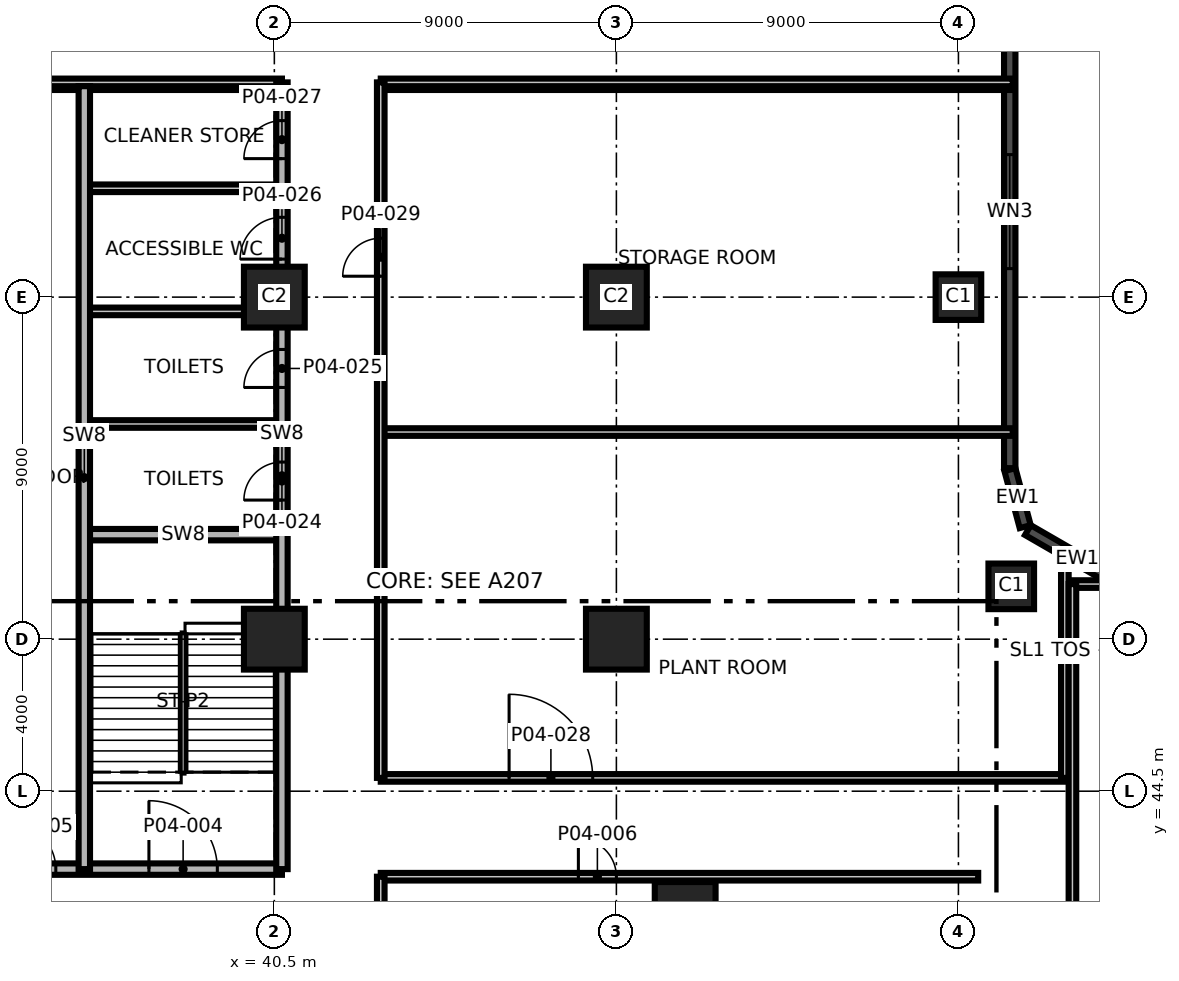
"""IFC4 building model, lengths in metres.
Left out: names, types, materials, properties, quantities, classifications, styles, units other than length and angle.
Written with IfcOpenShell. Run it as: python <this file> out.ifc"""

import sys

from ifc_helpers import new_model, si_unit, direction, frame, frame_2d, origin, origin_2d, place, context, subcontext, project, spatial, rectangle, extrude, element, fill, save


model = new_model("IFC4")
c1 = context("Model", 3, precision=1e-05, world=origin(), true_north=direction((0.0, 1.0)))
c2 = subcontext(c1, "Body", "Model", "MODEL_VIEW")
j1 = project(units=[si_unit("LENGTHUNIT", "METRE"), si_unit("PLANEANGLEUNIT", "RADIAN")], contexts=[c1])
p1 = place(None, origin())
s1 = spatial("IfcSite", under=j1, at=p1, CompositionType="ELEMENT")
p2 = place(p1, origin())
s2 = spatial("IfcBuilding", under=s1, at=p2, CompositionType="ELEMENT")
p3 = place(p2, frame((0.0, 0.0, 23.5)))
s3 = spatial("IfcBuildingStorey", under=s2, at=p3, CompositionType="ELEMENT", Elevation=23.5)
for number, where, z_axis, x_axis in (
    (1, (40.5, 48.5, 0.0), (0.0, 0.0, 1.0), (1.0, 0.0, 0.0)),
    (2, (49.5, 48.5, 0.0), (0.0, 0.0, 1.0), (1.0, 0.0, 0.0)),
):
    element("IfcColumn", number, at=place(p3, frame(where, z_axis=z_axis, x_axis=x_axis)), inside=s3, PredefinedType="COLUMN", context=c2, shape_type="SweptSolid", body=[
        extrude(rectangle(XDim=1.6, YDim=1.6, at=origin_2d()), origin(), (0.0, 0.0, 1.0), 5.0),
    ])
p4 = place(p3, frame((59.89, 49.89, 0.0), z_axis=(0.0, 0.0, 1.0), x_axis=(1.0, 0.0, 0.0)))
e3 = element("IfcColumn", 3, at=p4, inside=s3, PredefinedType="COLUMN", context=c2, shape_type="SweptSolid", body=[
    extrude(rectangle(XDim=1.2, YDim=1.2, at=origin_2d()), origin(), (0.0, 0.0, 1.0), 5.0),
])
for number, where, z_axis, x_axis in (
    (4, (40.5, 57.5, 0.0), (0.0, 0.0, 1.0), (1.0, 0.0, 0.0)),
    (5, (49.5, 57.5, 0.0), (0.0, 0.0, 1.0), (1.0, 0.0, 0.0)),
):
    element("IfcColumn", number, at=place(p3, frame(where, z_axis=z_axis, x_axis=x_axis)), inside=s3, PredefinedType="COLUMN", context=c2, shape_type="SweptSolid", body=[
        extrude(rectangle(XDim=1.6, YDim=1.6, at=origin_2d()), origin(), (0.0, 0.0, 1.0), 5.0),
    ])
p5 = place(p3, frame((58.5, 57.5, 0.0), z_axis=(0.0, 0.0, 1.0), x_axis=(1.0, 0.0, 0.0)))
e6 = element("IfcColumn", 6, at=p5, inside=s3, PredefinedType="COLUMN", context=c2, shape_type="SweptSolid", body=[
    extrude(rectangle(XDim=1.2, YDim=1.2, at=origin_2d()), origin(), (0.0, 0.0, 1.0), 5.0),
])
p6 = place(p3, frame((51.31, 41.31, 0.0), z_axis=(0.0, 0.0, 1.0), x_axis=(1.0, 0.0, 0.0)))
e7 = element("IfcColumn", 7, at=p6, inside=s3, PredefinedType="COLUMN", context=c2, shape_type="SweptSolid", body=[
    extrude(rectangle(XDim=1.6, YDim=1.6, at=origin_2d()), origin(), (0.0, 0.0, 1.0), 5.0),
])
p7 = place(p3, frame((62.925, 49.87, 0.0), z_axis=(0.0, 0.0, 1.0), x_axis=(-0.866031096941, 0.499990139034, 0.0)))
e8 = element("IfcWall", 8, at=p7, inside=s3, PredefinedType="SOLIDWALL", context=c2, shape_type="SweptSolid", body=[
    extrude(rectangle(XDim=3.0, YDim=0.3, at=frame_2d((1.5, 0.0))), origin(), (0.0, 0.0, 1.0), 4.7),
])
p8 = place(p3, frame((60.257, 51.461, 0.0), z_axis=(0.0, 0.0, 1.0), x_axis=(-0.258777996848, 0.965936824201, 0.0)))
e9 = element("IfcWall", 9, at=p8, inside=s3, PredefinedType="SOLIDWALL", context=c2, shape_type="SweptSolid", body=[
    extrude(rectangle(XDim=1.553, YDim=0.3, at=frame_2d((0.776, 0.0))), origin(), (0.0, 0.0, 1.0), 4.7),
])
p9 = place(p3, frame((59.85, 53.0, 0.0), z_axis=(0.0, 0.0, 1.0), x_axis=(0.0, 1.0, 0.0)))
e10 = element("IfcWall", 10, at=p9, inside=s3, PredefinedType="SOLIDWALL", context=c2, shape_type="SweptSolid", body=[
    extrude(rectangle(XDim=26.928, YDim=0.3, at=frame_2d((13.464, 0.0))), origin(), (0.0, 0.0, 1.0), 4.7),
])
p10 = place(p9, frame((5.25, 0.0, 0.9)))
e11 = element("IfcOpeningElement", 11, at=p10, cuts=e10, PredefinedType="OPENING", context=c2, shape_type="SweptSolid", body=[
    extrude(rectangle(XDim=3.0, YDim=2.4, at=frame_2d((1.5, 1.2))), frame((0.0, 0.16, 0.0), z_axis=(0.0, -1.0, 0.0), x_axis=(1.0, 0.0, 0.0)), (0.0, 0.0, 1.0), 0.32),
])
p11 = place(p9, frame((14.25, 0.0, 0.9)))
e12 = element("IfcOpeningElement", 12, at=p11, cuts=e10, PredefinedType="OPENING", context=c2, shape_type="SweptSolid", body=[
    extrude(rectangle(XDim=3.0, YDim=2.4, at=frame_2d((1.5, 1.2))), frame((0.0, 0.16, 0.0), z_axis=(0.0, -1.0, 0.0), x_axis=(1.0, 0.0, 0.0)), (0.0, 0.0, 1.0), 0.32),
])
p12 = place(p9, frame((18.75, 0.0, 0.9)))
e13 = element("IfcOpeningElement", 13, at=p12, cuts=e10, PredefinedType="OPENING", context=c2, shape_type="SweptSolid", body=[
    extrude(rectangle(XDim=3.0, YDim=2.4, at=frame_2d((1.5, 1.2))), frame((0.0, 0.16, 0.0), z_axis=(0.0, -1.0, 0.0), x_axis=(1.0, 0.0, 0.0)), (0.0, 0.0, 1.0), 0.32),
])
p13 = place(p9, frame((23.25, 0.0, 0.9)))
e14 = element("IfcOpeningElement", 14, at=p13, cuts=e10, PredefinedType="OPENING", context=c2, shape_type="SweptSolid", body=[
    extrude(rectangle(XDim=3.0, YDim=2.4, at=frame_2d((1.5, 1.2))), frame((0.0, 0.16, 0.0), z_axis=(0.0, -1.0, 0.0), x_axis=(1.0, 0.0, 0.0)), (0.0, 0.0, 1.0), 0.32),
])
p14 = place(p3, frame((43.3, 42.25, 0.0), z_axis=(0.0, 0.0, 1.0), x_axis=(1.0, 0.0, 0.0)))
e15 = element("IfcWall", 15, at=p14, inside=s3, PredefinedType="PARTITIONING", context=c2, shape_type="SweptSolid", body=[
    extrude(rectangle(XDim=15.72, YDim=0.2, at=frame_2d((7.86, 0.0))), origin(), (0.0, 0.0, 1.0), 4.7),
])
p15 = place(p14, frame((5.2, 0.0, 0.0)))
e16 = element("IfcOpeningElement", 16, at=p15, cuts=e15, PredefinedType="OPENING", context=c2, shape_type="SweptSolid", body=[
    extrude(rectangle(XDim=1.0, YDim=2.1, at=frame_2d((0.5, 1.05))), frame((0.0, 0.11, 0.0), z_axis=(0.0, -1.0, 0.0), x_axis=(1.0, 0.0, 0.0)), (0.0, 0.0, 1.0), 0.22),
])
p16 = place(p3, frame((21.07, 42.45, 0.0), z_axis=(0.0, 0.0, 1.0), x_axis=(1.0, 0.0, 0.0)))
e17 = element("IfcWall", 17, at=p16, inside=s3, PredefinedType="SHEAR", context=c2, shape_type="SweptSolid", body=[
    extrude(rectangle(XDim=19.63, YDim=0.3, at=frame_2d((9.815, 0.0))), origin(), (0.0, 0.0, 1.0), 4.7),
])
p17 = place(p16, frame((16.13, 0.0, 0.0)))
e18 = element("IfcOpeningElement", 18, at=p17, cuts=e17, PredefinedType="OPENING", context=c2, shape_type="SweptSolid", body=[
    extrude(rectangle(XDim=1.8, YDim=2.1, at=frame_2d((0.9, 1.05))), frame((0.0, 0.16, 0.0), z_axis=(0.0, -1.0, 0.0), x_axis=(1.0, 0.0, 0.0)), (0.0, 0.0, 1.0), 0.32),
])
p18 = place(p16, frame((12.48, 0.0, 0.0)))
e19 = element("IfcOpeningElement", 19, at=p18, cuts=e17, PredefinedType="OPENING", context=c2, shape_type="SweptSolid", body=[
    extrude(rectangle(XDim=1.2, YDim=2.1, at=frame_2d((0.6, 1.05))), frame((0.0, 0.16, 0.0), z_axis=(0.0, -1.0, 0.0), x_axis=(1.0, 0.0, 0.0)), (0.0, 0.0, 1.0), 0.32),
])
p19 = place(p16, frame((5.33, 0.0, 0.0)))
e20 = element("IfcOpeningElement", 20, at=p19, cuts=e17, PredefinedType="OPENING", context=c2, shape_type="SweptSolid", body=[
    extrude(rectangle(XDim=1.0, YDim=2.1, at=frame_2d((0.5, 1.05))), frame((0.0, 0.16, 0.0), z_axis=(0.0, -1.0, 0.0), x_axis=(1.0, 0.0, 0.0)), (0.0, 0.0, 1.0), 0.32),
])
p20 = place(p3, frame((43.3, 44.85, 0.0), z_axis=(0.0, 0.0, 1.0), x_axis=(1.0, 0.0, 0.0)))
e21 = element("IfcWall", 21, at=p20, inside=s3, PredefinedType="PARTITIONING", context=c2, shape_type="SweptSolid", body=[
    extrude(rectangle(XDim=18.2, YDim=0.2, at=frame_2d((9.1, 0.0))), origin(), (0.0, 0.0, 1.0), 4.7),
])
p21 = place(p20, frame((3.377, 0.0, 0.0)))
e22 = element("IfcOpeningElement", 22, at=p21, cuts=e21, PredefinedType="OPENING", context=c2, shape_type="SweptSolid", body=[
    extrude(rectangle(XDim=2.2, YDim=2.4, at=frame_2d((1.1, 1.2))), frame((0.0, 0.11, 0.0), z_axis=(0.0, -1.0, 0.0), x_axis=(1.0, 0.0, 0.0)), (0.0, 0.0, 1.0), 0.22),
])
p22 = place(p3, frame((61.5, 49.95, 0.0), z_axis=(0.0, 0.0, 1.0), x_axis=(1.0, 0.0, 0.0)))
e23 = element("IfcWall", 23, at=p22, inside=s3, PredefinedType="PARTITIONING", context=c2, shape_type="SweptSolid", body=[
    extrude(rectangle(XDim=1.416, YDim=0.2, at=frame_2d((0.708, 0.0))), origin(), (0.0, 0.0, 1.0), 4.7),
])
p23 = place(p3, frame((35.5, 51.25, 0.0), z_axis=(0.0, 0.0, 1.0), x_axis=(1.0, 0.0, 0.0)))
e24 = element("IfcWall", 24, at=p23, inside=s3, PredefinedType="SHEAR", context=c2, shape_type="SweptSolid", body=[
    extrude(rectangle(XDim=5.2, YDim=0.3, at=frame_2d((2.6, 0.0))), origin(), (0.0, 0.0, 1.0), 4.7),
])
p24 = place(p3, frame((43.3, 53.95, 0.0), z_axis=(0.0, 0.0, 1.0), x_axis=(1.0, 0.0, 0.0)))
e25 = element("IfcWall", 25, at=p24, inside=s3, PredefinedType="PARTITIONING", context=c2, shape_type="SweptSolid", body=[
    extrude(rectangle(XDim=16.63, YDim=0.2, at=frame_2d((8.315, 0.0))), origin(), (0.0, 0.0, 1.0), 4.7),
])
for number, where, z_axis, x_axis in (
    (26, (35.55, 54.162, 0.0), (0.0, 0.0, 1.0), (1.0, 0.0, 0.0)),
    (27, (35.55, 57.125, 0.0), (0.0, 0.0, 1.0), (1.0, 0.0, 0.0)),
    (28, (35.55, 60.364, 0.0), (0.0, 0.0, 1.0), (1.0, 0.0, 0.0)),
):
    element("IfcWall", number, at=place(p3, frame(where, z_axis=z_axis, x_axis=x_axis)), inside=s3, PredefinedType="PARTITIONING", context=c2, shape_type="SweptSolid", body=[
        extrude(rectangle(XDim=5.15, YDim=0.2, at=frame_2d((2.575, 0.0))), origin(), (0.0, 0.0, 1.0), 4.7),
    ])
p25 = place(p3, frame((21.07, 63.05, 0.0), z_axis=(0.0, 0.0, 1.0), x_axis=(1.0, 0.0, 0.0)))
e29 = element("IfcWall", 29, at=p25, inside=s3, PredefinedType="PARTITIONING", context=c2, shape_type="SweptSolid", body=[
    extrude(rectangle(XDim=14.43, YDim=0.2, at=frame_2d((7.215, 0.0))), origin(), (0.0, 0.0, 1.0), 4.7),
])
p26 = place(p3, frame((35.55, 63.05, 0.0), z_axis=(0.0, 0.0, 1.0), x_axis=(1.0, 0.0, 0.0)))
e30 = element("IfcWall", 30, at=p26, inside=s3, PredefinedType="PARTITIONING", context=c2, shape_type="SweptSolid", body=[
    extrude(rectangle(XDim=5.15, YDim=0.2, at=frame_2d((2.575, 0.0))), origin(), (0.0, 0.0, 1.0), 4.7),
])
p27 = place(p3, frame((43.3, 63.05, 0.0), z_axis=(0.0, 0.0, 1.0), x_axis=(1.0, 0.0, 0.0)))
e31 = element("IfcWall", 31, at=p27, inside=s3, PredefinedType="PARTITIONING", context=c2, shape_type="SweptSolid", body=[
    extrude(rectangle(XDim=16.63, YDim=0.2, at=frame_2d((8.315, 0.0))), origin(), (0.0, 0.0, 1.0), 4.7),
])
p28 = place(p3, frame((21.07, 63.15, 0.0), z_axis=(0.0, 0.0, 1.0), x_axis=(1.0, 0.0, 0.0)))
e32 = element("IfcWall", 32, at=p28, inside=s3, PredefinedType="PARTITIONING", context=c2, shape_type="SweptSolid", body=[
    extrude(rectangle(XDim=19.63, YDim=0.2, at=frame_2d((9.815, 0.0))), origin(), (0.0, 0.0, 1.0), 4.7),
])
p29 = place(p3, frame((43.3, 63.15, 0.0), z_axis=(0.0, 0.0, 1.0), x_axis=(1.0, 0.0, 0.0)))
e33 = element("IfcWall", 33, at=p29, inside=s3, PredefinedType="PARTITIONING", context=c2, shape_type="SweptSolid", body=[
    extrude(rectangle(XDim=16.63, YDim=0.2, at=frame_2d((8.315, 0.0))), origin(), (0.0, 0.0, 1.0), 4.7),
])
p30 = place(p3, frame((35.5, 42.45, 0.0), z_axis=(0.0, 0.0, 1.0), x_axis=(0.0, 1.0, 0.0)))
e34 = element("IfcWall", 34, at=p30, inside=s3, PredefinedType="SHEAR", context=c2, shape_type="SweptSolid", body=[
    extrude(rectangle(XDim=20.6, YDim=0.3, at=frame_2d((10.3, 0.0))), origin(), (0.0, 0.0, 1.0), 4.7),
])
p31 = place(p3, frame((40.7, 42.45, 0.0), z_axis=(0.0, 0.0, 1.0), x_axis=(0.0, 1.0, 0.0)))
e35 = element("IfcWall", 35, at=p31, inside=s3, PredefinedType="SHEAR", context=c2, shape_type="SweptSolid", body=[
    extrude(rectangle(XDim=20.7, YDim=0.3, at=frame_2d((10.35, 0.0))), origin(), (0.0, 0.0, 1.0), 4.7),
])
p32 = place(p31, frame((9.71, 0.0, 0.0)))
e36 = element("IfcOpeningElement", 36, at=p32, cuts=e35, PredefinedType="OPENING", context=c2, shape_type="SweptSolid", body=[
    extrude(rectangle(XDim=1.0, YDim=2.1, at=frame_2d((0.5, 1.05))), frame((0.0, 0.16, 0.0), z_axis=(0.0, -1.0, 0.0), x_axis=(1.0, 0.0, 0.0)), (0.0, 0.0, 1.0), 0.32),
])
p33 = place(p31, frame((12.673, 0.0, 0.0)))
e37 = element("IfcOpeningElement", 37, at=p33, cuts=e35, PredefinedType="OPENING", context=c2, shape_type="SweptSolid", body=[
    extrude(rectangle(XDim=1.0, YDim=2.1, at=frame_2d((0.5, 1.05))), frame((0.0, 0.16, 0.0), z_axis=(0.0, -1.0, 0.0), x_axis=(1.0, 0.0, 0.0)), (0.0, 0.0, 1.0), 0.32),
])
p34 = place(p31, frame((16.05, 0.0, 0.0)))
e38 = element("IfcOpeningElement", 38, at=p34, cuts=e35, PredefinedType="OPENING", context=c2, shape_type="SweptSolid", body=[
    extrude(rectangle(XDim=1.1, YDim=2.1, at=frame_2d((0.55, 1.05))), frame((0.0, 0.16, 0.0), z_axis=(0.0, -1.0, 0.0), x_axis=(1.0, 0.0, 0.0)), (0.0, 0.0, 1.0), 0.32),
])
p35 = place(p31, frame((18.694, 0.0, 0.0)))
e39 = element("IfcOpeningElement", 39, at=p35, cuts=e35, PredefinedType="OPENING", context=c2, shape_type="SweptSolid", body=[
    extrude(rectangle(XDim=1.0, YDim=2.1, at=frame_2d((0.5, 1.05))), frame((0.0, 0.16, 0.0), z_axis=(0.0, -1.0, 0.0), x_axis=(1.0, 0.0, 0.0)), (0.0, 0.0, 1.0), 0.32),
])
p36 = place(p3, frame((43.3, 39.97, 0.0), z_axis=(0.0, 0.0, 1.0), x_axis=(0.0, 1.0, 0.0)))
e40 = element("IfcWall", 40, at=p36, inside=s3, PredefinedType="PARTITIONING", context=c2, shape_type="SweptSolid", body=[
    extrude(rectangle(XDim=2.28, YDim=0.2, at=frame_2d((1.14, 0.0))), origin(), (0.0, 0.0, 1.0), 4.7),
])
p37 = place(p3, frame((43.3, 44.85, 0.0), z_axis=(0.0, 0.0, 1.0), x_axis=(0.0, 1.0, 0.0)))
e41 = element("IfcWall", 41, at=p37, inside=s3, PredefinedType="PARTITIONING", context=c2, shape_type="SweptSolid", body=[
    extrude(rectangle(XDim=18.3, YDim=0.2, at=frame_2d((9.15, 0.0))), origin(), (0.0, 0.0, 1.0), 4.7),
])
p38 = place(p37, frame((13.2, 0.0, 0.0)))
e42 = element("IfcOpeningElement", 42, at=p38, cuts=e41, PredefinedType="OPENING", context=c2, shape_type="SweptSolid", body=[
    extrude(rectangle(XDim=1.0, YDim=2.1, at=frame_2d((0.5, 1.05))), frame((0.0, 0.11, 0.0), z_axis=(0.0, -1.0, 0.0), x_axis=(1.0, 0.0, 0.0)), (0.0, 0.0, 1.0), 0.22),
])
p39 = place(p3, frame((61.3, 44.85, 0.0), z_axis=(0.0, 0.0, 1.0), x_axis=(0.0, 1.0, 0.0)))
e43 = element("IfcWall", 43, at=p39, inside=s3, PredefinedType="PARTITIONING", context=c2, shape_type="SweptSolid", body=[
    extrude(rectangle(XDim=5.742, YDim=0.2, at=frame_2d((2.871, 0.0))), origin(), (0.0, 0.0, 1.0), 4.7),
])
p40 = place(p3, frame((61.5, 33.5, 0.0), z_axis=(0.0, 0.0, 1.0), x_axis=(0.0, 1.0, 0.0)))
e44 = element("IfcWall", 44, at=p40, inside=s3, PredefinedType="PARTITIONING", context=c2, shape_type="SweptSolid", body=[
    extrude(rectangle(XDim=16.45, YDim=0.2, at=frame_2d((8.225, 0.0))), origin(), (0.0, 0.0, 1.0), 4.7),
])
p41 = place(p40, frame((1.398, 0.0, 0.0)))
e45 = element("IfcOpeningElement", 45, at=p41, cuts=e44, PredefinedType="OPENING", context=c2, shape_type="SweptSolid", body=[
    extrude(rectangle(XDim=1.0, YDim=2.1, at=frame_2d((0.5, 1.05))), frame((0.0, 0.11, 0.0), z_axis=(0.0, -1.0, 0.0), x_axis=(1.0, 0.0, 0.0)), (0.0, 0.0, 1.0), 0.22),
])
p42 = place(p10, origin())
e46 = element("IfcWindow", 46, at=p42, inside=s3, PartitioningType="SINGLE_PANEL", PredefinedType="WINDOW", context=c2, shape_type="SweptSolid", body=[
    extrude(rectangle(XDim=3.0, YDim=2.4, at=frame_2d((1.5, 1.2))), frame((0.0, 0.03, 0.0), z_axis=(0.0, -1.0, 0.0), x_axis=(1.0, 0.0, 0.0)), (0.0, 0.0, 1.0), 0.06),
])
fill(e11, e46)
p43 = place(p17, origin())
e47 = element("IfcDoor", 47, at=p43, inside=s3, OperationType="SINGLE_SWING_RIGHT", PredefinedType="DOOR", context=c2, shape_type="SweptSolid", body=[
    extrude(rectangle(XDim=1.8, YDim=2.1, at=frame_2d((0.9, 1.05))), frame((0.0, 0.025, 0.0), z_axis=(0.0, -1.0, 0.0), x_axis=(1.0, 0.0, 0.0)), (0.0, 0.0, 1.0), 0.05),
])
fill(e18, e47)
p44 = place(p18, origin())
e48 = element("IfcDoor", 48, at=p44, inside=s3, OperationType="SINGLE_SWING_LEFT", PredefinedType="DOOR", context=c2, shape_type="SweptSolid", body=[
    extrude(rectangle(XDim=1.2, YDim=2.1, at=frame_2d((0.6, 1.05))), frame((0.0, 0.025, 0.0), z_axis=(0.0, -1.0, 0.0), x_axis=(1.0, 0.0, 0.0)), (0.0, 0.0, 1.0), 0.05),
])
fill(e19, e48)
p45 = place(p15, origin())
e49 = element("IfcDoor", 49, at=p45, inside=s3, OperationType="SINGLE_SWING_RIGHT", PredefinedType="DOOR", context=c2, shape_type="SweptSolid", body=[
    extrude(rectangle(XDim=1.0, YDim=2.1, at=frame_2d((0.5, 1.05))), frame((0.0, 0.025, 0.0), z_axis=(0.0, -1.0, 0.0), x_axis=(1.0, 0.0, 0.0)), (0.0, 0.0, 1.0), 0.05),
])
fill(e16, e49)
p46 = place(p32, origin())
e50 = element("IfcDoor", 50, at=p46, inside=s3, OperationType="SINGLE_SWING_RIGHT", PredefinedType="DOOR", context=c2, shape_type="SweptSolid", body=[
    extrude(rectangle(XDim=1.0, YDim=2.1, at=frame_2d((0.5, 1.05))), frame((0.0, 0.025, 0.0), z_axis=(0.0, -1.0, 0.0), x_axis=(1.0, 0.0, 0.0)), (0.0, 0.0, 1.0), 0.05),
])
fill(e36, e50)
p47 = place(p33, origin())
e51 = element("IfcDoor", 51, at=p47, inside=s3, OperationType="SINGLE_SWING_LEFT", PredefinedType="DOOR", context=c2, shape_type="SweptSolid", body=[
    extrude(rectangle(XDim=1.0, YDim=2.1, at=frame_2d((0.5, 1.05))), frame((0.0, 0.025, 0.0), z_axis=(0.0, -1.0, 0.0), x_axis=(1.0, 0.0, 0.0)), (0.0, 0.0, 1.0), 0.05),
])
fill(e37, e51)
p48 = place(p34, origin())
e52 = element("IfcDoor", 52, at=p48, inside=s3, OperationType="SINGLE_SWING_RIGHT", PredefinedType="DOOR", context=c2, shape_type="SweptSolid", body=[
    extrude(rectangle(XDim=1.1, YDim=2.1, at=frame_2d((0.55, 1.05))), frame((0.0, 0.025, 0.0), z_axis=(0.0, -1.0, 0.0), x_axis=(1.0, 0.0, 0.0)), (0.0, 0.0, 1.0), 0.05),
])
fill(e38, e52)
p49 = place(p35, origin())
e53 = element("IfcDoor", 53, at=p49, inside=s3, OperationType="SINGLE_SWING_LEFT", PredefinedType="DOOR", context=c2, shape_type="SweptSolid", body=[
    extrude(rectangle(XDim=1.0, YDim=2.1, at=frame_2d((0.5, 1.05))), frame((0.0, 0.025, 0.0), z_axis=(0.0, -1.0, 0.0), x_axis=(1.0, 0.0, 0.0)), (0.0, 0.0, 1.0), 0.05),
])
fill(e39, e53)
p50 = place(p21, origin())
e54 = element("IfcDoor", 54, at=p50, inside=s3, OperationType="SINGLE_SWING_RIGHT", PredefinedType="DOOR", context=c2, shape_type="SweptSolid", body=[
    extrude(rectangle(XDim=2.2, YDim=2.4, at=frame_2d((1.1, 1.2))), frame((0.0, 0.025, 0.0), z_axis=(0.0, -1.0, 0.0), x_axis=(1.0, 0.0, 0.0)), (0.0, 0.0, 1.0), 0.05),
])
fill(e22, e54)
p51 = place(p38, origin())
e55 = element("IfcDoor", 55, at=p51, inside=s3, OperationType="SINGLE_SWING_LEFT", PredefinedType="DOOR", context=c2, shape_type="SweptSolid", body=[
    extrude(rectangle(XDim=1.0, YDim=2.1, at=frame_2d((0.5, 1.05))), frame((0.0, 0.025, 0.0), z_axis=(0.0, -1.0, 0.0), x_axis=(1.0, 0.0, 0.0)), (0.0, 0.0, 1.0), 0.05),
])
fill(e42, e55)
save(model, sys.argv[1])
